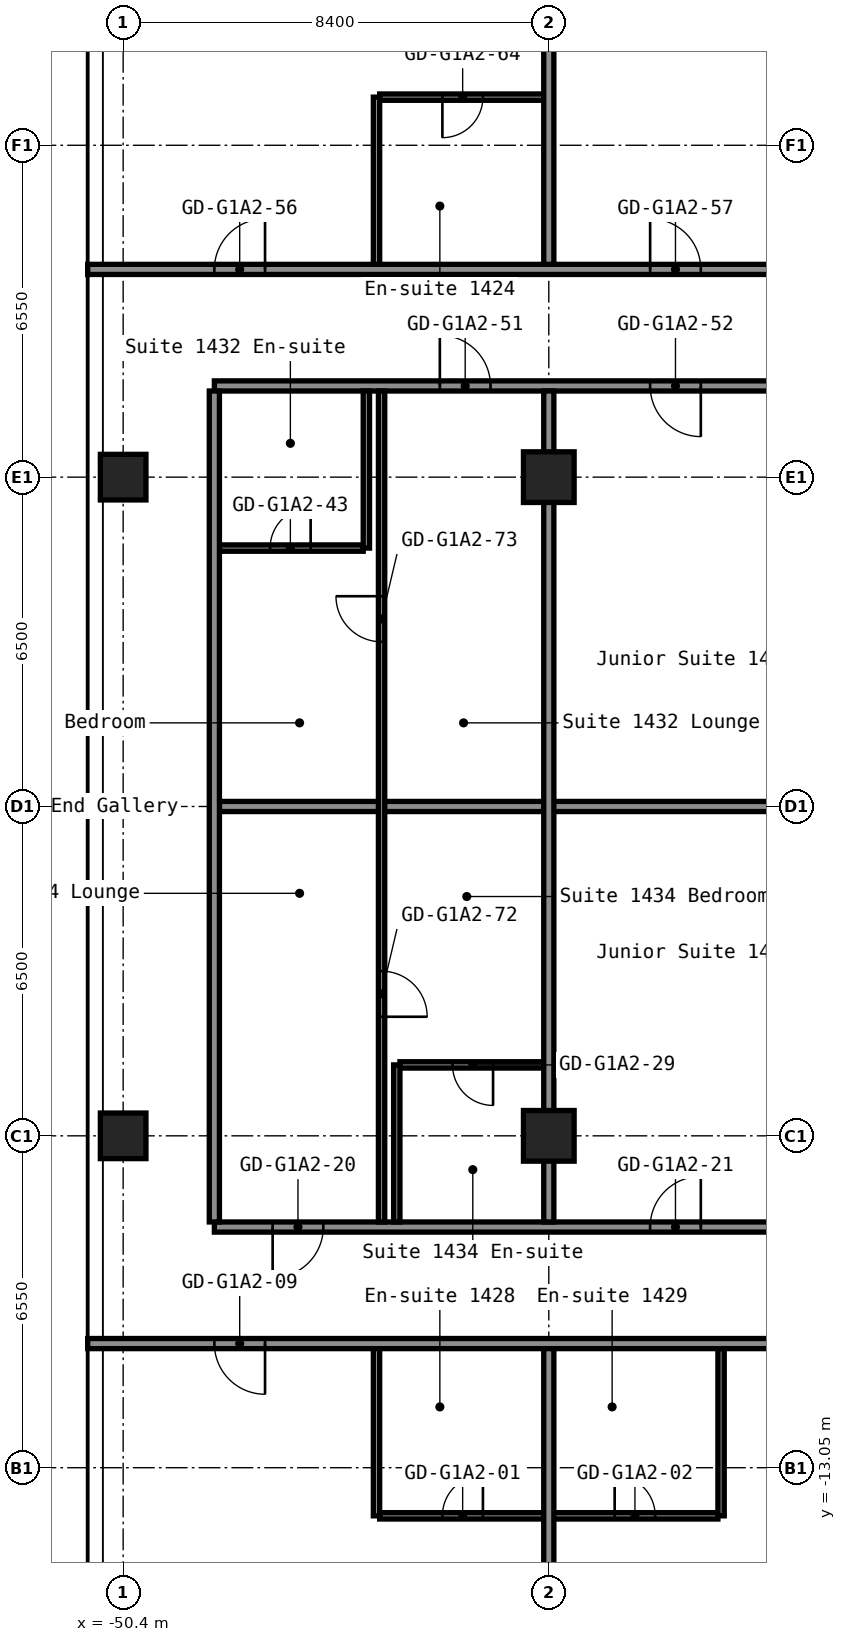
"""IFC4 building model, lengths in metres.
Left out: names, types, materials, properties, quantities, classifications, styles, units other than length and angle.
Written with IfcOpenShell. Run it as: python <this file> out.ifc"""

import sys

from ifc_helpers import new_model, si_unit, direction, frame, frame_2d, origin, origin_2d, place, context, subcontext, project, spatial, rectangle, hollow_rectangle, extrude, element, fill, save


model = new_model("IFC4")
c1 = context("Model", 3, precision=1e-05, world=origin(), true_north=direction((0.0, 1.0)))
c2 = subcontext(c1, "Body", "Model", "MODEL_VIEW")
j1 = project(units=[si_unit("LENGTHUNIT", "METRE"), si_unit("PLANEANGLEUNIT", "RADIAN")], contexts=[c1])
p1 = place(None, origin())
s1 = spatial("IfcSite", under=j1, at=p1, CompositionType="ELEMENT")
p2 = place(p1, origin())
s2 = spatial("IfcBuilding", under=s1, at=p2, CompositionType="ELEMENT")
p3 = place(p2, frame((0.0, 0.0, 51.8)))
s3 = spatial("IfcBuildingStorey", under=s2, at=p3, CompositionType="ELEMENT", Elevation=51.8)
for number, where, z_axis, x_axis in (
    (1, (-50.4, -6.5, 0.0), (0.0, 0.0, 1.0), (1.0, 0.0, 0.0)),
    (2, (-50.4, 6.5, 0.0), (0.0, 0.0, 1.0), (1.0, 0.0, 0.0)),
):
    element("IfcColumn", number, at=place(p3, frame(where, z_axis=z_axis, x_axis=x_axis)), inside=s3, PredefinedType="COLUMN", context=c2, shape_type="SweptSolid", body=[
        extrude(hollow_rectangle(XDim=0.9, YDim=0.9, WallThickness=0.036, at=origin_2d()), origin(), (0.0, 0.0, 1.0), 2.8),
    ])
for number, where, z_axis, x_axis in (
    (3, (-42.0, -6.5, 0.0), (0.0, 0.0, 1.0), (1.0, 0.0, 0.0)),
    (4, (-42.0, 6.5, 0.0), (0.0, 0.0, 1.0), (1.0, 0.0, 0.0)),
):
    element("IfcColumn", number, at=place(p3, frame(where, z_axis=z_axis, x_axis=x_axis)), inside=s3, PredefinedType="COLUMN", context=c2, shape_type="SweptSolid", body=[
        extrude(hollow_rectangle(XDim=1.0, YDim=1.0, WallThickness=0.04, at=origin_2d()), origin(), (0.0, 0.0, 1.0), 2.8),
    ])
p4 = place(p3, frame((-45.337, -14.0, 0.0), z_axis=(0.0, 0.0, 1.0), x_axis=(1.0, 0.0, 0.0)))
e5 = element("IfcWall", 5, at=p4, inside=s3, PredefinedType="PARTITIONING", context=c2, shape_type="SweptSolid", body=[
    extrude(rectangle(XDim=6.675, YDim=0.125, at=frame_2d((3.337, 0.0))), origin(), (0.0, 0.0, 1.0), 2.8),
])
p5 = place(p4, frame((1.238, 0.0, 0.0)))
e6 = element("IfcOpeningElement", 6, at=p5, cuts=e5, PredefinedType="OPENING", context=c2, shape_type="SweptSolid", body=[
    extrude(rectangle(XDim=0.8, YDim=2.1, at=frame_2d((0.4, 1.05))), frame((0.0, 0.073, 0.0), z_axis=(0.0, -1.0, 0.0), x_axis=(1.0, 0.0, 0.0)), (0.0, 0.0, 1.0), 0.145),
])
p6 = place(p4, frame((4.637, 0.0, 0.0)))
e7 = element("IfcOpeningElement", 7, at=p6, cuts=e5, PredefinedType="OPENING", context=c2, shape_type="SweptSolid", body=[
    extrude(rectangle(XDim=0.8, YDim=2.1, at=frame_2d((0.4, 1.05))), frame((0.0, 0.073, 0.0), z_axis=(0.0, -1.0, 0.0), x_axis=(1.0, 0.0, 0.0)), (0.0, 0.0, 1.0), 0.145),
])
p7 = place(p3, frame((-51.1, -10.6, 0.0), z_axis=(0.0, 0.0, 1.0), x_axis=(1.0, 0.0, 0.0)))
e8 = element("IfcWall", 8, at=p7, inside=s3, PredefinedType="PARTITIONING", context=c2, shape_type="SweptSolid", body=[
    extrude(rectangle(XDim=34.3, YDim=0.2, at=frame_2d((17.15, 0.0))), origin(), (0.0, 0.0, 1.0), 2.8),
])
p8 = place(p7, frame((2.5, 0.0, 0.0)))
e9 = element("IfcOpeningElement", 9, at=p8, cuts=e8, PredefinedType="OPENING", context=c2, shape_type="SweptSolid", body=[
    extrude(rectangle(XDim=1.0, YDim=2.1, at=frame_2d((0.5, 1.05))), frame((0.0, 0.11, 0.0), z_axis=(0.0, -1.0, 0.0), x_axis=(1.0, 0.0, 0.0)), (0.0, 0.0, 1.0), 0.22),
])
p9 = place(p7, frame((14.5, 0.0, 0.0)))
e10 = element("IfcOpeningElement", 10, at=p9, cuts=e8, PredefinedType="OPENING", context=c2, shape_type="SweptSolid", body=[
    extrude(rectangle(XDim=1.0, YDim=2.1, at=frame_2d((0.5, 1.05))), frame((0.0, 0.11, 0.0), z_axis=(0.0, -1.0, 0.0), x_axis=(1.0, 0.0, 0.0)), (0.0, 0.0, 1.0), 0.22),
])
p10 = place(p7, frame((22.9, 0.0, 0.0)))
e11 = element("IfcOpeningElement", 11, at=p10, cuts=e8, PredefinedType="OPENING", context=c2, shape_type="SweptSolid", body=[
    extrude(rectangle(XDim=1.0, YDim=2.1, at=frame_2d((0.5, 1.05))), frame((0.0, 0.11, 0.0), z_axis=(0.0, -1.0, 0.0), x_axis=(1.0, 0.0, 0.0)), (0.0, 0.0, 1.0), 0.22),
])
p11 = place(p7, frame((27.9, 0.0, 0.0)))
e12 = element("IfcOpeningElement", 12, at=p11, cuts=e8, PredefinedType="OPENING", context=c2, shape_type="SweptSolid", body=[
    extrude(rectangle(XDim=1.0, YDim=2.1, at=frame_2d((0.5, 1.05))), frame((0.0, 0.11, 0.0), z_axis=(0.0, -1.0, 0.0), x_axis=(1.0, 0.0, 0.0)), (0.0, 0.0, 1.0), 0.22),
])
p12 = place(p3, frame((-48.6, -8.3, 0.0), z_axis=(0.0, 0.0, 1.0), x_axis=(1.0, 0.0, 0.0)))
e13 = element("IfcWall", 13, at=p12, inside=s3, PredefinedType="PARTITIONING", context=c2, shape_type="SweptSolid", body=[
    extrude(rectangle(XDim=15.0, YDim=0.2, at=frame_2d((7.5, 0.0))), origin(), (0.0, 0.0, 1.0), 2.8),
])
p13 = place(p12, frame((1.15, 0.0, 0.0)))
e14 = element("IfcOpeningElement", 14, at=p13, cuts=e13, PredefinedType="OPENING", context=c2, shape_type="SweptSolid", body=[
    extrude(rectangle(XDim=1.0, YDim=2.1, at=frame_2d((0.5, 1.05))), frame((0.0, 0.11, 0.0), z_axis=(0.0, -1.0, 0.0), x_axis=(1.0, 0.0, 0.0)), (0.0, 0.0, 1.0), 0.22),
])
p14 = place(p12, frame((8.6, 0.0, 0.0)))
e15 = element("IfcOpeningElement", 15, at=p14, cuts=e13, PredefinedType="OPENING", context=c2, shape_type="SweptSolid", body=[
    extrude(rectangle(XDim=1.0, YDim=2.1, at=frame_2d((0.5, 1.05))), frame((0.0, 0.11, 0.0), z_axis=(0.0, -1.0, 0.0), x_axis=(1.0, 0.0, 0.0)), (0.0, 0.0, 1.0), 0.22),
])
p15 = place(p3, frame((-44.938, -5.1, 0.0), z_axis=(0.0, 0.0, 1.0), x_axis=(1.0, 0.0, 0.0)))
e16 = element("IfcWall", 16, at=p15, inside=s3, PredefinedType="PARTITIONING", context=c2, shape_type="SweptSolid", body=[
    extrude(rectangle(XDim=2.837, YDim=0.125, at=frame_2d((1.419, 0.0))), origin(), (0.0, 0.0, 1.0), 2.8),
])
p16 = place(p15, frame((1.038, 0.0, 0.0)))
e17 = element("IfcOpeningElement", 17, at=p16, cuts=e16, PredefinedType="OPENING", context=c2, shape_type="SweptSolid", body=[
    extrude(rectangle(XDim=0.8, YDim=2.1, at=frame_2d((0.4, 1.05))), frame((0.0, 0.073, 0.0), z_axis=(0.0, -1.0, 0.0), x_axis=(1.0, 0.0, 0.0)), (0.0, 0.0, 1.0), 0.145),
])
p17 = place(p3, frame((-48.5, 0.0, 0.0), z_axis=(0.0, 0.0, 1.0), x_axis=(1.0, 0.0, 0.0)))
e18 = element("IfcWall", 18, at=p17, inside=s3, PredefinedType="PARTITIONING", context=c2, shape_type="SweptSolid", body=[
    extrude(rectangle(XDim=14.9, YDim=0.2, at=frame_2d((7.45, 0.0))), origin(), (0.0, 0.0, 1.0), 2.8),
])
p18 = place(p3, frame((-48.5, 5.1, 0.0), z_axis=(0.0, 0.0, 1.0), x_axis=(1.0, 0.0, 0.0)))
e19 = element("IfcWall", 19, at=p18, inside=s3, PredefinedType="PARTITIONING", context=c2, shape_type="SweptSolid", body=[
    extrude(rectangle(XDim=2.837, YDim=0.125, at=frame_2d((1.419, 0.0))), origin(), (0.0, 0.0, 1.0), 2.8),
])
p19 = place(p18, frame((1.0, 0.0, 0.0)))
e20 = element("IfcOpeningElement", 20, at=p19, cuts=e19, PredefinedType="OPENING", context=c2, shape_type="SweptSolid", body=[
    extrude(rectangle(XDim=0.8, YDim=2.1, at=frame_2d((0.4, 1.05))), frame((0.0, 0.073, 0.0), z_axis=(0.0, -1.0, 0.0), x_axis=(1.0, 0.0, 0.0)), (0.0, 0.0, 1.0), 0.145),
])
p20 = place(p3, frame((-48.6, 8.3, 0.0), z_axis=(0.0, 0.0, 1.0), x_axis=(1.0, 0.0, 0.0)))
e21 = element("IfcWall", 21, at=p20, inside=s3, PredefinedType="PARTITIONING", context=c2, shape_type="SweptSolid", body=[
    extrude(rectangle(XDim=15.0, YDim=0.2, at=frame_2d((7.5, 0.0))), origin(), (0.0, 0.0, 1.0), 2.8),
])
p21 = place(p20, frame((4.45, 0.0, 0.0)))
e22 = element("IfcOpeningElement", 22, at=p21, cuts=e21, PredefinedType="OPENING", context=c2, shape_type="SweptSolid", body=[
    extrude(rectangle(XDim=1.0, YDim=2.1, at=frame_2d((0.5, 1.05))), frame((0.0, 0.11, 0.0), z_axis=(0.0, -1.0, 0.0), x_axis=(1.0, 0.0, 0.0)), (0.0, 0.0, 1.0), 0.22),
])
p22 = place(p20, frame((8.6, 0.0, 0.0)))
e23 = element("IfcOpeningElement", 23, at=p22, cuts=e21, PredefinedType="OPENING", context=c2, shape_type="SweptSolid", body=[
    extrude(rectangle(XDim=1.0, YDim=2.1, at=frame_2d((0.5, 1.05))), frame((0.0, 0.11, 0.0), z_axis=(0.0, -1.0, 0.0), x_axis=(1.0, 0.0, 0.0)), (0.0, 0.0, 1.0), 0.22),
])
p23 = place(p3, frame((-51.1, 10.6, 0.0), z_axis=(0.0, 0.0, 1.0), x_axis=(1.0, 0.0, 0.0)))
e24 = element("IfcWall", 24, at=p23, inside=s3, PredefinedType="PARTITIONING", context=c2, shape_type="SweptSolid", body=[
    extrude(rectangle(XDim=34.3, YDim=0.2, at=frame_2d((17.15, 0.0))), origin(), (0.0, 0.0, 1.0), 2.8),
])
p24 = place(p23, frame((2.5, 0.0, 0.0)))
e25 = element("IfcOpeningElement", 25, at=p24, cuts=e24, PredefinedType="OPENING", context=c2, shape_type="SweptSolid", body=[
    extrude(rectangle(XDim=1.0, YDim=2.1, at=frame_2d((0.5, 1.05))), frame((0.0, 0.11, 0.0), z_axis=(0.0, -1.0, 0.0), x_axis=(1.0, 0.0, 0.0)), (0.0, 0.0, 1.0), 0.22),
])
p25 = place(p23, frame((11.1, 0.0, 0.0)))
e26 = element("IfcOpeningElement", 26, at=p25, cuts=e24, PredefinedType="OPENING", context=c2, shape_type="SweptSolid", body=[
    extrude(rectangle(XDim=1.0, YDim=2.1, at=frame_2d((0.5, 1.05))), frame((0.0, 0.11, 0.0), z_axis=(0.0, -1.0, 0.0), x_axis=(1.0, 0.0, 0.0)), (0.0, 0.0, 1.0), 0.22),
])
p26 = place(p23, frame((22.9, 0.0, 0.0)))
e27 = element("IfcOpeningElement", 27, at=p26, cuts=e24, PredefinedType="OPENING", context=c2, shape_type="SweptSolid", body=[
    extrude(rectangle(XDim=1.0, YDim=2.1, at=frame_2d((0.5, 1.05))), frame((0.0, 0.11, 0.0), z_axis=(0.0, -1.0, 0.0), x_axis=(1.0, 0.0, 0.0)), (0.0, 0.0, 1.0), 0.22),
])
p27 = place(p23, frame((27.9, 0.0, 0.0)))
e28 = element("IfcOpeningElement", 28, at=p27, cuts=e24, PredefinedType="OPENING", context=c2, shape_type="SweptSolid", body=[
    extrude(rectangle(XDim=1.0, YDim=2.1, at=frame_2d((0.5, 1.05))), frame((0.0, 0.11, 0.0), z_axis=(0.0, -1.0, 0.0), x_axis=(1.0, 0.0, 0.0)), (0.0, 0.0, 1.0), 0.22),
])
p28 = place(p3, frame((-45.337, 14.0, 0.0), z_axis=(0.0, 0.0, 1.0), x_axis=(1.0, 0.0, 0.0)))
e29 = element("IfcWall", 29, at=p28, inside=s3, PredefinedType="PARTITIONING", context=c2, shape_type="SweptSolid", body=[
    extrude(rectangle(XDim=3.237, YDim=0.125, at=frame_2d((1.619, 0.0))), origin(), (0.0, 0.0, 1.0), 2.8),
])
p29 = place(p28, frame((1.238, 0.0, 0.0)))
e30 = element("IfcOpeningElement", 30, at=p29, cuts=e29, PredefinedType="OPENING", context=c2, shape_type="SweptSolid", body=[
    extrude(rectangle(XDim=0.8, YDim=2.1, at=frame_2d((0.4, 1.05))), frame((0.0, 0.073, 0.0), z_axis=(0.0, -1.0, 0.0), x_axis=(1.0, 0.0, 0.0)), (0.0, 0.0, 1.0), 0.145),
])
p30 = place(p3, frame((-48.6, -8.2, 0.0), z_axis=(0.0, 0.0, 1.0), x_axis=(0.0, 1.0, 0.0)))
e31 = element("IfcWall", 31, at=p30, inside=s3, PredefinedType="PARTITIONING", context=c2, shape_type="SweptSolid", body=[
    extrude(rectangle(XDim=16.4, YDim=0.2, at=frame_2d((8.2, 0.0))), origin(), (0.0, 0.0, 1.0), 2.8),
])
p31 = place(p3, frame((-45.6, 5.1, 0.0), z_axis=(0.0, 0.0, 1.0), x_axis=(0.0, 1.0, 0.0)))
e32 = element("IfcWall", 32, at=p31, inside=s3, PredefinedType="PARTITIONING", context=c2, shape_type="SweptSolid", body=[
    extrude(rectangle(XDim=3.1, YDim=0.125, at=frame_2d((1.55, 0.0))), origin(), (0.0, 0.0, 1.0), 2.8),
])
for number, where, z_axis, x_axis in (
    (33, (-45.4, -14.0, 0.0), (0.0, 0.0, 1.0), (0.0, 1.0, 0.0)),
    (34, (-45.4, 10.7, 0.0), (0.0, 0.0, 1.0), (0.0, 1.0, 0.0)),
):
    element("IfcWall", number, at=place(p3, frame(where, z_axis=z_axis, x_axis=x_axis)), inside=s3, PredefinedType="PARTITIONING", context=c2, shape_type="SweptSolid", body=[
        extrude(rectangle(XDim=3.3, YDim=0.125, at=frame_2d((1.65, 0.0))), origin(), (0.0, 0.0, 1.0), 2.8),
    ])
p32 = place(p3, frame((-45.3, -8.2, 0.0), z_axis=(0.0, 0.0, 1.0), x_axis=(0.0, 1.0, 0.0)))
e35 = element("IfcWall", 35, at=p32, inside=s3, PredefinedType="PARTITIONING", context=c2, shape_type="SweptSolid", body=[
    extrude(rectangle(XDim=16.4, YDim=0.125, at=frame_2d((8.2, 0.0))), origin(), (0.0, 0.0, 1.0), 2.8),
])
p33 = place(p32, frame((4.05, 0.0, 0.0)))
e36 = element("IfcOpeningElement", 36, at=p33, cuts=e35, PredefinedType="OPENING", context=c2, shape_type="SweptSolid", body=[
    extrude(rectangle(XDim=0.9, YDim=2.1, at=frame_2d((0.45, 1.05))), frame((0.0, 0.073, 0.0), z_axis=(0.0, -1.0, 0.0), x_axis=(1.0, 0.0, 0.0)), (0.0, 0.0, 1.0), 0.145),
])
p34 = place(p32, frame((11.45, 0.0, 0.0)))
e37 = element("IfcOpeningElement", 37, at=p34, cuts=e35, PredefinedType="OPENING", context=c2, shape_type="SweptSolid", body=[
    extrude(rectangle(XDim=0.9, YDim=2.1, at=frame_2d((0.45, 1.05))), frame((0.0, 0.073, 0.0), z_axis=(0.0, -1.0, 0.0), x_axis=(1.0, 0.0, 0.0)), (0.0, 0.0, 1.0), 0.145),
])
p35 = place(p3, frame((-45.0, -8.2, 0.0), z_axis=(0.0, 0.0, 1.0), x_axis=(0.0, 1.0, 0.0)))
e38 = element("IfcWall", 38, at=p35, inside=s3, PredefinedType="PARTITIONING", context=c2, shape_type="SweptSolid", body=[
    extrude(rectangle(XDim=3.1, YDim=0.125, at=frame_2d((1.55, 0.0))), origin(), (0.0, 0.0, 1.0), 2.8),
])
p36 = place(p3, frame((-42.0, -20.3, 0.0), z_axis=(0.0, 0.0, 1.0), x_axis=(0.0, 1.0, 0.0)))
e39 = element("IfcWall", 39, at=p36, inside=s3, PredefinedType="PARTITIONING", context=c2, shape_type="SweptSolid", body=[
    extrude(rectangle(XDim=9.6, YDim=0.2, at=frame_2d((4.8, 0.0))), origin(), (0.0, 0.0, 1.0), 2.8),
])
p37 = place(p3, frame((-42.0, -8.2, 0.0), z_axis=(0.0, 0.0, 1.0), x_axis=(0.0, 1.0, 0.0)))
e40 = element("IfcWall", 40, at=p37, inside=s3, PredefinedType="PARTITIONING", context=c2, shape_type="SweptSolid", body=[
    extrude(rectangle(XDim=16.4, YDim=0.2, at=frame_2d((8.2, 0.0))), origin(), (0.0, 0.0, 1.0), 2.8),
])
p38 = place(p3, frame((-42.0, 10.7, 0.0), z_axis=(0.0, 0.0, 1.0), x_axis=(0.0, 1.0, 0.0)))
e41 = element("IfcWall", 41, at=p38, inside=s3, PredefinedType="PARTITIONING", context=c2, shape_type="SweptSolid", body=[
    extrude(rectangle(XDim=9.6, YDim=0.2, at=frame_2d((4.8, 0.0))), origin(), (0.0, 0.0, 1.0), 2.8),
])
p39 = place(p3, frame((-38.6, -14.0, 0.0), z_axis=(0.0, 0.0, 1.0), x_axis=(0.0, 1.0, 0.0)))
e42 = element("IfcWall", 42, at=p39, inside=s3, PredefinedType="PARTITIONING", context=c2, shape_type="SweptSolid", body=[
    extrude(rectangle(XDim=3.3, YDim=0.125, at=frame_2d((1.65, 0.0))), origin(), (0.0, 0.0, 1.0), 2.8),
])
p40 = place(p5, origin())
e43 = element("IfcDoor", 43, at=p40, inside=s3, OperationType="SINGLE_SWING_LEFT", PredefinedType="DOOR", context=c2, shape_type="SweptSolid", body=[
    extrude(rectangle(XDim=0.8, YDim=2.1, at=frame_2d((0.4, 1.05))), frame((0.0, 0.025, 0.0), z_axis=(0.0, -1.0, 0.0), x_axis=(1.0, 0.0, 0.0)), (0.0, 0.0, 1.0), 0.05),
])
fill(e6, e43)
p41 = place(p6, origin())
e44 = element("IfcDoor", 44, at=p41, inside=s3, OperationType="SINGLE_SWING_RIGHT", PredefinedType="DOOR", context=c2, shape_type="SweptSolid", body=[
    extrude(rectangle(XDim=0.8, YDim=2.1, at=frame_2d((0.4, 1.05))), frame((0.0, 0.025, 0.0), z_axis=(0.0, -1.0, 0.0), x_axis=(1.0, 0.0, 0.0)), (0.0, 0.0, 1.0), 0.05),
])
fill(e7, e44)
p42 = place(p8, origin())
e45 = element("IfcDoor", 45, at=p42, inside=s3, OperationType="SINGLE_SWING_RIGHT", PredefinedType="DOOR", context=c2, shape_type="SweptSolid", body=[
    extrude(rectangle(XDim=1.0, YDim=2.1, at=frame_2d((0.5, 1.05))), frame((0.0, 0.025, 0.0), z_axis=(0.0, -1.0, 0.0), x_axis=(1.0, 0.0, 0.0)), (0.0, 0.0, 1.0), 0.05),
])
fill(e9, e45)
p43 = place(p13, origin())
e46 = element("IfcDoor", 46, at=p43, inside=s3, OperationType="SINGLE_SWING_LEFT", PredefinedType="DOOR", context=c2, shape_type="SweptSolid", body=[
    extrude(rectangle(XDim=1.0, YDim=2.1, at=frame_2d((0.5, 1.05))), frame((0.0, 0.025, 0.0), z_axis=(0.0, -1.0, 0.0), x_axis=(1.0, 0.0, 0.0)), (0.0, 0.0, 1.0), 0.05),
])
fill(e14, e46)
p44 = place(p14, origin())
e47 = element("IfcDoor", 47, at=p44, inside=s3, OperationType="SINGLE_SWING_LEFT", PredefinedType="DOOR", context=c2, shape_type="SweptSolid", body=[
    extrude(rectangle(XDim=1.0, YDim=2.1, at=frame_2d((0.5, 1.05))), frame((0.0, 0.025, 0.0), z_axis=(0.0, -1.0, 0.0), x_axis=(1.0, 0.0, 0.0)), (0.0, 0.0, 1.0), 0.05),
])
fill(e15, e47)
p45 = place(p16, origin())
e48 = element("IfcDoor", 48, at=p45, inside=s3, OperationType="SINGLE_SWING_RIGHT", PredefinedType="DOOR", context=c2, shape_type="SweptSolid", body=[
    extrude(rectangle(XDim=0.8, YDim=2.1, at=frame_2d((0.4, 1.05))), frame((0.0, 0.025, 0.0), z_axis=(0.0, -1.0, 0.0), x_axis=(1.0, 0.0, 0.0)), (0.0, 0.0, 1.0), 0.05),
])
fill(e17, e48)
p46 = place(p19, origin())
e49 = element("IfcDoor", 49, at=p46, inside=s3, OperationType="SINGLE_SWING_LEFT", PredefinedType="DOOR", context=c2, shape_type="SweptSolid", body=[
    extrude(rectangle(XDim=0.8, YDim=2.1, at=frame_2d((0.4, 1.05))), frame((0.0, 0.025, 0.0), z_axis=(0.0, -1.0, 0.0), x_axis=(1.0, 0.0, 0.0)), (0.0, 0.0, 1.0), 0.05),
])
fill(e20, e49)
p47 = place(p21, origin())
e50 = element("IfcDoor", 50, at=p47, inside=s3, OperationType="SINGLE_SWING_RIGHT", PredefinedType="DOOR", context=c2, shape_type="SweptSolid", body=[
    extrude(rectangle(XDim=1.0, YDim=2.1, at=frame_2d((0.5, 1.05))), frame((0.0, 0.025, 0.0), z_axis=(0.0, -1.0, 0.0), x_axis=(1.0, 0.0, 0.0)), (0.0, 0.0, 1.0), 0.05),
])
fill(e22, e50)
p48 = place(p22, origin())
e51 = element("IfcDoor", 51, at=p48, inside=s3, OperationType="SINGLE_SWING_RIGHT", PredefinedType="DOOR", context=c2, shape_type="SweptSolid", body=[
    extrude(rectangle(XDim=1.0, YDim=2.1, at=frame_2d((0.5, 1.05))), frame((0.0, 0.025, 0.0), z_axis=(0.0, -1.0, 0.0), x_axis=(1.0, 0.0, 0.0)), (0.0, 0.0, 1.0), 0.05),
])
fill(e23, e51)
p49 = place(p24, origin())
e52 = element("IfcDoor", 52, at=p49, inside=s3, OperationType="SINGLE_SWING_LEFT", PredefinedType="DOOR", context=c2, shape_type="SweptSolid", body=[
    extrude(rectangle(XDim=1.0, YDim=2.1, at=frame_2d((0.5, 1.05))), frame((0.0, 0.025, 0.0), z_axis=(0.0, -1.0, 0.0), x_axis=(1.0, 0.0, 0.0)), (0.0, 0.0, 1.0), 0.05),
])
fill(e25, e52)
p50 = place(p25, origin())
e53 = element("IfcDoor", 53, at=p50, inside=s3, OperationType="SINGLE_SWING_RIGHT", PredefinedType="DOOR", context=c2, shape_type="SweptSolid", body=[
    extrude(rectangle(XDim=1.0, YDim=2.1, at=frame_2d((0.5, 1.05))), frame((0.0, 0.025, 0.0), z_axis=(0.0, -1.0, 0.0), x_axis=(1.0, 0.0, 0.0)), (0.0, 0.0, 1.0), 0.05),
])
fill(e26, e53)
p51 = place(p29, origin())
e54 = element("IfcDoor", 54, at=p51, inside=s3, OperationType="SINGLE_SWING_LEFT", PredefinedType="DOOR", context=c2, shape_type="SweptSolid", body=[
    extrude(rectangle(XDim=0.8, YDim=2.1, at=frame_2d((0.4, 1.05))), frame((0.0, 0.025, 0.0), z_axis=(0.0, -1.0, 0.0), x_axis=(1.0, 0.0, 0.0)), (0.0, 0.0, 1.0), 0.05),
])
fill(e30, e54)
p52 = place(p33, origin())
e55 = element("IfcDoor", 55, at=p52, inside=s3, OperationType="SINGLE_SWING_LEFT", PredefinedType="DOOR", context=c2, shape_type="SweptSolid", body=[
    extrude(rectangle(XDim=0.9, YDim=2.1, at=frame_2d((0.45, 1.05))), frame((0.0, 0.025, 0.0), z_axis=(0.0, -1.0, 0.0), x_axis=(1.0, 0.0, 0.0)), (0.0, 0.0, 1.0), 0.05),
])
fill(e36, e55)
p53 = place(p34, origin())
e56 = element("IfcDoor", 56, at=p53, inside=s3, OperationType="SINGLE_SWING_LEFT", PredefinedType="DOOR", context=c2, shape_type="SweptSolid", body=[
    extrude(rectangle(XDim=0.9, YDim=2.1, at=frame_2d((0.45, 1.05))), frame((0.0, 0.025, 0.0), z_axis=(0.0, -1.0, 0.0), x_axis=(1.0, 0.0, 0.0)), (0.0, 0.0, 1.0), 0.05),
])
fill(e37, e56)
save(model, sys.argv[1])
